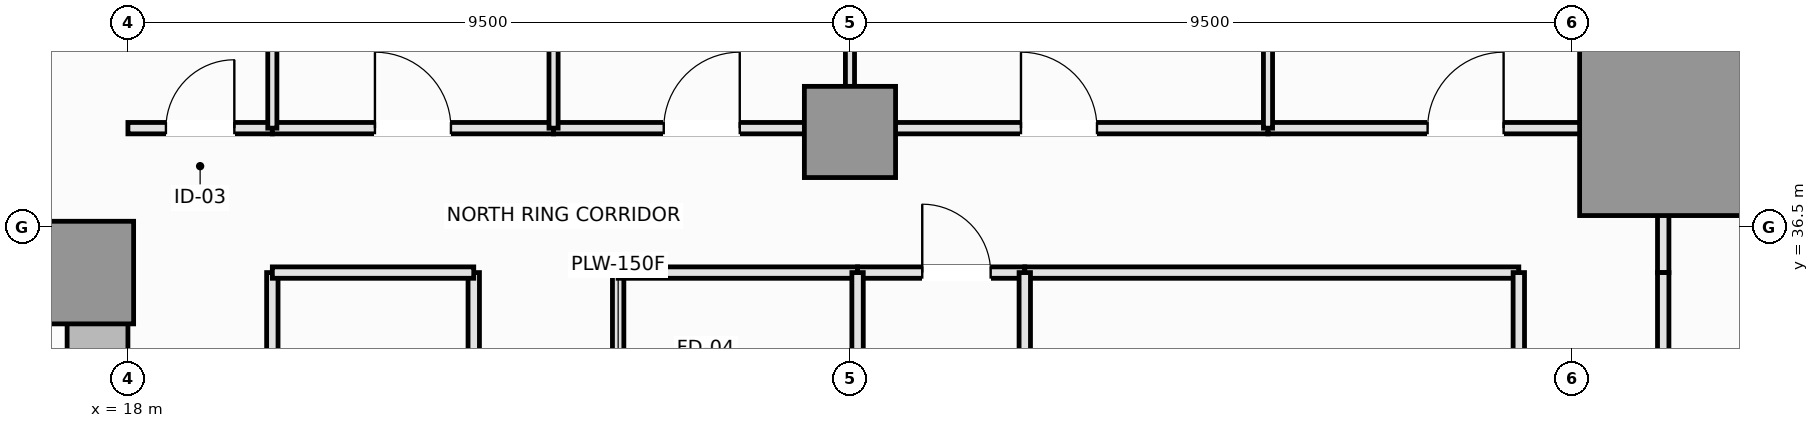
"""IFC4 building model, lengths in metres.
Left out: names, types, materials, properties, quantities, classifications, styles, units other than length and angle.
Written with IfcOpenShell. Run it as: python <this file> out.ifc"""

import sys

from ifc_helpers import new_model, si_unit, direction, frame, frame_2d, origin, origin_2d, place, context, subcontext, project, spatial, rectangle, extrude, element, fill, save


model = new_model("IFC4")
c1 = context("Model", 3, precision=1e-05, world=origin(), true_north=direction((0.0, 1.0)))
c2 = subcontext(c1, "Body", "Model", "MODEL_VIEW")
j1 = project(units=[si_unit("LENGTHUNIT", "METRE"), si_unit("PLANEANGLEUNIT", "RADIAN")], contexts=[c1])
p1 = place(None, origin())
s1 = spatial("IfcSite", under=j1, at=p1, CompositionType="ELEMENT")
p2 = place(p1, origin())
s2 = spatial("IfcBuilding", under=s1, at=p2, CompositionType="ELEMENT")
p3 = place(p2, frame((0.0, 0.0, 64.65)))
s3 = spatial("IfcBuildingStorey", under=s2, at=p3, CompositionType="ELEMENT", Elevation=64.65)
p4 = place(p3, frame((4.5, 36.1, 0.0), z_axis=(0.0, 0.0, 1.0), x_axis=(1.0, 0.0, 0.0)))
e1 = element("IfcWall", 1, at=p4, inside=s3, PredefinedType="SHEAR", context=c2, shape_type="SweptSolid", body=[
    extrude(rectangle(XDim=13.5, YDim=0.8, at=frame_2d((6.75, 0.0))), origin(), (0.0, 0.0, 1.0), 3.55),
])
p5 = place(p3, frame((17.6, 27.05, 0.0), z_axis=(0.0, 0.0, 1.0), x_axis=(0.0, 1.0, 0.0)))
e2 = element("IfcWall", 2, at=p5, inside=s3, PredefinedType="SHEAR", context=c2, shape_type="SweptSolid", body=[
    extrude(rectangle(XDim=8.65, YDim=0.8, at=frame_2d((4.325, 0.0))), origin(), (0.0, 0.0, 1.0), 3.55),
])
p6 = place(p5, frame((3.45, 0.0, 0.0)))
e3 = element("IfcOpeningElement", 3, at=p6, cuts=e2, PredefinedType="OPENING", context=c2, shape_type="SweptSolid", body=[
    extrude(rectangle(XDim=1.1, YDim=2.15, at=frame_2d((0.55, 1.075))), frame((0.0, 0.41, 0.0), z_axis=(0.0, -1.0, 0.0), x_axis=(1.0, 0.0, 0.0)), (0.0, 0.0, 1.0), 0.82),
])
p7 = place(p3, frame((17.4, 35.9, 0.0), z_axis=(0.0, 0.0, 1.0), x_axis=(1.0, 0.0, 0.0)))
e4 = element("IfcColumn", 4, at=p7, inside=s3, PredefinedType="PILASTER", context=c2, shape_type="SweptSolid", body=[
    extrude(rectangle(XDim=1.35, YDim=1.35, at=origin_2d()), origin(), (0.0, 0.0, 1.0), 3.55),
])
p8 = place(p3, frame((38.2, 37.75, 0.0), z_axis=(0.0, 0.0, 1.0), x_axis=(1.0, 0.0, 0.0)))
e5 = element("IfcColumn", 5, at=p8, inside=s3, PredefinedType="COLUMN", context=c2, shape_type="SweptSolid", body=[
    extrude(rectangle(XDim=2.2, YDim=2.2, at=origin_2d()), origin(), (0.0, 0.0, 1.0), 3.55),
])
p9 = place(p3, frame((27.5, 37.75, 0.0), z_axis=(0.0, 0.0, 1.0), x_axis=(1.0, 0.0, 0.0)))
e6 = element("IfcColumn", 6, at=p9, inside=s3, PredefinedType="COLUMN", context=c2, shape_type="SweptSolid", body=[
    extrude(rectangle(XDim=1.2, YDim=1.2, at=origin_2d()), origin(), (0.0, 0.0, 1.0), 3.55),
])
p10 = place(p3, frame((22.55, 29.75, 0.0), z_axis=(0.0, 0.0, 1.0), x_axis=(0.0, 1.0, 0.0)))
e7 = element("IfcWall", 7, at=p10, inside=s3, PredefinedType="PARTITIONING", context=c2, shape_type="SweptSolid", body=[
    extrude(rectangle(XDim=6.15, YDim=0.15, at=frame_2d((3.075, 0.0))), origin(), (0.0, 0.0, 1.0), 3.01),
])
p11 = place(p10, frame((2.575, 0.0, 0.0)))
e8 = element("IfcOpeningElement", 8, at=p11, cuts=e7, PredefinedType="OPENING", context=c2, shape_type="SweptSolid", body=[
    extrude(rectangle(XDim=1.0, YDim=2.15, at=frame_2d((0.5, 1.075))), frame((0.0, 0.085, 0.0), z_axis=(0.0, -1.0, 0.0), x_axis=(1.0, 0.0, 0.0)), (0.0, 0.0, 1.0), 0.17),
])
p12 = place(p3, frame((24.45, 32.8, 0.0), z_axis=(0.0, 0.0, 1.0), x_axis=(0.0, 1.0, 0.0)))
e9 = element("IfcWall", 9, at=p12, inside=s3, PredefinedType="PLUMBINGWALL", context=c2, shape_type="SweptSolid", body=[
    extrude(rectangle(XDim=3.1, YDim=0.15, at=frame_2d((1.55, 0.0))), origin(), (0.0, 0.0, 1.0), 3.37),
])
p13 = place(p12, frame((1.1, 0.0, 0.0)))
e10 = element("IfcOpeningElement", 10, at=p13, cuts=e9, PredefinedType="OPENING", context=c2, shape_type="SweptSolid", body=[
    extrude(rectangle(XDim=0.9, YDim=2.1, at=frame_2d((0.45, 1.05))), frame((0.0, 0.085, 0.0), z_axis=(0.0, -1.0, 0.0), x_axis=(1.0, 0.0, 0.0)), (0.0, 0.0, 1.0), 0.17),
])
p14 = place(p3, frame((19.9, 29.75, 0.0), z_axis=(0.0, 0.0, 1.0), x_axis=(0.0, 1.0, 0.0)))
e11 = element("IfcWall", 11, at=p14, inside=s3, PredefinedType="PARTITIONING", context=c2, shape_type="SweptSolid", body=[
    extrude(rectangle(XDim=6.15, YDim=0.15, at=frame_2d((3.075, 0.0))), origin(), (0.0, 0.0, 1.0), 3.37),
])
p15 = place(p3, frame((19.9, 35.9, 0.0), z_axis=(0.0, 0.0, 1.0), x_axis=(1.0, 0.0, 0.0)))
e12 = element("IfcWall", 12, at=p15, inside=s3, PredefinedType="PARTITIONING", context=c2, shape_type="SweptSolid", body=[
    extrude(rectangle(XDim=2.65, YDim=0.15, at=frame_2d((1.325, 0.0))), origin(), (0.0, 0.0, 1.0), 3.37),
])
p16 = place(p3, frame((24.45, 35.9, 0.0), z_axis=(0.0, 0.0, 1.0), x_axis=(1.0, 0.0, 0.0)))
e13 = element("IfcWall", 13, at=p16, inside=s3, PredefinedType="PLUMBINGWALL", context=c2, shape_type="SweptSolid", body=[
    extrude(rectangle(XDim=3.15, YDim=0.15, at=frame_2d((1.575, 0.0))), origin(), (0.0, 0.0, 1.0), 3.37),
])
p17 = place(p3, frame((27.6, 35.9, 0.0), z_axis=(0.0, 0.0, 1.0), x_axis=(1.0, 0.0, 0.0)))
e14 = element("IfcWall", 14, at=p17, inside=s3, PredefinedType="PLUMBINGWALL", context=c2, shape_type="SweptSolid", body=[
    extrude(rectangle(XDim=2.2, YDim=0.15, at=frame_2d((1.1, 0.0))), origin(), (0.0, 0.0, 1.0), 3.37),
])
p18 = place(p17, frame((0.851, 0.0, 0.0)))
e15 = element("IfcOpeningElement", 15, at=p18, cuts=e14, PredefinedType="OPENING", context=c2, shape_type="SweptSolid", body=[
    extrude(rectangle(XDim=0.9, YDim=2.1, at=frame_2d((0.45, 1.05))), frame((0.0, 0.085, 0.0), z_axis=(0.0, -1.0, 0.0), x_axis=(1.0, 0.0, 0.0)), (0.0, 0.0, 1.0), 0.17),
])
p19 = place(p3, frame((29.8, 35.9, 0.0), z_axis=(0.0, 0.0, 1.0), x_axis=(1.0, 0.0, 0.0)))
e16 = element("IfcWall", 16, at=p19, inside=s3, PredefinedType="PARTITIONING", context=c2, shape_type="SweptSolid", body=[
    extrude(rectangle(XDim=6.5, YDim=0.15, at=frame_2d((3.25, 0.0))), origin(), (0.0, 0.0, 1.0), 3.37),
])
p20 = place(p3, frame((18.0, 37.8, 0.0), z_axis=(0.0, 0.0, 1.0), x_axis=(1.0, 0.0, 0.0)))
e17 = element("IfcWall", 17, at=p20, inside=s3, PredefinedType="PARTITIONING", context=c2, shape_type="SweptSolid", body=[
    extrude(rectangle(XDim=1.9, YDim=0.15, at=frame_2d((0.95, 0.0))), origin(), (0.0, 0.0, 1.0), 2.72),
])
p21 = place(p20, frame((0.5, 0.0, 0.0)))
e18 = element("IfcOpeningElement", 18, at=p21, cuts=e17, PredefinedType="OPENING", context=c2, shape_type="SweptSolid", body=[
    extrude(rectangle(XDim=0.9, YDim=2.1, at=frame_2d((0.45, 1.05))), frame((0.0, 0.085, 0.0), z_axis=(0.0, -1.0, 0.0), x_axis=(1.0, 0.0, 0.0)), (0.0, 0.0, 1.0), 0.17),
])
p22 = place(p3, frame((19.9, 37.8, 0.0), z_axis=(0.0, 0.0, 1.0), x_axis=(1.0, 0.0, 0.0)))
e19 = element("IfcWall", 19, at=p22, inside=s3, PredefinedType="PARTITIONING", context=c2, shape_type="SweptSolid", body=[
    extrude(rectangle(XDim=3.7, YDim=0.15, at=frame_2d((1.85, 0.0))), origin(), (0.0, 0.0, 1.0), 2.72),
])
p23 = place(p22, frame((1.35, 0.0, 0.0)))
e20 = element("IfcOpeningElement", 20, at=p23, cuts=e19, PredefinedType="OPENING", context=c2, shape_type="SweptSolid", body=[
    extrude(rectangle(XDim=1.0, YDim=2.15, at=frame_2d((0.5, 1.075))), frame((0.0, 0.085, 0.0), z_axis=(0.0, -1.0, 0.0), x_axis=(1.0, 0.0, 0.0)), (0.0, 0.0, 1.0), 0.17),
])
p24 = place(p3, frame((23.6, 37.8, 0.0), z_axis=(0.0, 0.0, 1.0), x_axis=(1.0, 0.0, 0.0)))
e21 = element("IfcWall", 21, at=p24, inside=s3, PredefinedType="PARTITIONING", context=c2, shape_type="SweptSolid", body=[
    extrude(rectangle(XDim=3.9, YDim=0.15, at=frame_2d((1.95, 0.0))), origin(), (0.0, 0.0, 1.0), 2.72),
])
p25 = place(p24, frame((1.45, 0.0, 0.0)))
e22 = element("IfcOpeningElement", 22, at=p25, cuts=e21, PredefinedType="OPENING", context=c2, shape_type="SweptSolid", body=[
    extrude(rectangle(XDim=1.0, YDim=2.15, at=frame_2d((0.5, 1.075))), frame((0.0, 0.085, 0.0), z_axis=(0.0, -1.0, 0.0), x_axis=(1.0, 0.0, 0.0)), (0.0, 0.0, 1.0), 0.17),
])
p26 = place(p3, frame((27.5, 37.8, 0.0), z_axis=(0.0, 0.0, 1.0), x_axis=(1.0, 0.0, 0.0)))
e23 = element("IfcWall", 23, at=p26, inside=s3, PredefinedType="PARTITIONING", context=c2, shape_type="SweptSolid", body=[
    extrude(rectangle(XDim=5.5, YDim=0.15, at=frame_2d((2.75, 0.0))), origin(), (0.0, 0.0, 1.0), 2.72),
])
p27 = place(p26, frame((2.25, 0.0, 0.0)))
e24 = element("IfcOpeningElement", 24, at=p27, cuts=e23, PredefinedType="OPENING", context=c2, shape_type="SweptSolid", body=[
    extrude(rectangle(XDim=1.0, YDim=2.15, at=frame_2d((0.5, 1.075))), frame((0.0, 0.085, 0.0), z_axis=(0.0, -1.0, 0.0), x_axis=(1.0, 0.0, 0.0)), (0.0, 0.0, 1.0), 0.17),
])
p28 = place(p3, frame((33.0, 37.8, 0.0), z_axis=(0.0, 0.0, 1.0), x_axis=(1.0, 0.0, 0.0)))
e25 = element("IfcWall", 25, at=p28, inside=s3, PredefinedType="PARTITIONING", context=c2, shape_type="SweptSolid", body=[
    extrude(rectangle(XDim=5.2, YDim=0.15, at=frame_2d((2.6, 0.0))), origin(), (0.0, 0.0, 1.0), 2.72),
])
p29 = place(p28, frame((2.1, 0.0, 0.0)))
e26 = element("IfcOpeningElement", 26, at=p29, cuts=e25, PredefinedType="OPENING", context=c2, shape_type="SweptSolid", body=[
    extrude(rectangle(XDim=1.0, YDim=2.15, at=frame_2d((0.5, 1.075))), frame((0.0, 0.085, 0.0), z_axis=(0.0, -1.0, 0.0), x_axis=(1.0, 0.0, 0.0)), (0.0, 0.0, 1.0), 0.17),
])
p30 = place(p3, frame((38.2, 35.9, 0.0), z_axis=(0.0, 0.0, 1.0), x_axis=(0.0, 1.0, 0.0)))
e27 = element("IfcWall", 27, at=p30, inside=s3, PredefinedType="PARTITIONING", context=c2, shape_type="SweptSolid", body=[
    extrude(rectangle(XDim=1.9, YDim=0.15, at=frame_2d((0.95, 0.0))), origin(), (0.0, 0.0, 1.0), 2.82),
])
p31 = place(p3, frame((36.3, 32.8, 0.0), z_axis=(0.0, 0.0, 1.0), x_axis=(0.0, 1.0, 0.0)))
e28 = element("IfcWall", 28, at=p31, inside=s3, PredefinedType="PARTITIONING", context=c2, shape_type="SweptSolid", body=[
    extrude(rectangle(XDim=3.1, YDim=0.15, at=frame_2d((1.55, 0.0))), origin(), (0.0, 0.0, 1.0), 3.37),
])
p32 = place(p31, frame((1.05, 0.0, 0.0)))
e29 = element("IfcOpeningElement", 29, at=p32, cuts=e28, PredefinedType="OPENING", context=c2, shape_type="SweptSolid", body=[
    extrude(rectangle(XDim=1.0, YDim=2.15, at=frame_2d((0.5, 1.075))), frame((0.0, 0.085, 0.0), z_axis=(0.0, -1.0, 0.0), x_axis=(1.0, 0.0, 0.0)), (0.0, 0.0, 1.0), 0.17),
])
p33 = place(p3, frame((38.2, 28.65, 0.0), z_axis=(0.0, 0.0, 1.0), x_axis=(0.0, 1.0, 0.0)))
e30 = element("IfcWall", 30, at=p33, inside=s3, PredefinedType="PARTITIONING", context=c2, shape_type="SweptSolid", body=[
    extrude(rectangle(XDim=7.25, YDim=0.15, at=frame_2d((3.625, 0.0))), origin(), (0.0, 0.0, 1.0), 2.82),
])
p34 = place(p33, frame((4.303, 0.0, 0.0)))
e31 = element("IfcOpeningElement", 31, at=p34, cuts=e30, PredefinedType="OPENING", context=c2, shape_type="SweptSolid", body=[
    extrude(rectangle(XDim=1.0, YDim=2.15, at=frame_2d((0.5, 1.075))), frame((0.0, 0.085, 0.0), z_axis=(0.0, -1.0, 0.0), x_axis=(1.0, 0.0, 0.0)), (0.0, 0.0, 1.0), 0.17),
])
for number, where, z_axis, x_axis in (
    (32, (27.6, 32.8, 0.0), (0.0, 0.0, 1.0), (0.0, 1.0, 0.0)),
    (33, (29.8, 32.8, 0.0), (0.0, 0.0, 1.0), (0.0, 1.0, 0.0)),
):
    element("IfcWall", number, at=place(p3, frame(where, z_axis=z_axis, x_axis=x_axis)), inside=s3, PredefinedType="PLUMBINGWALL", context=c2, shape_type="SweptSolid", body=[
        extrude(rectangle(XDim=3.1, YDim=0.15, at=frame_2d((1.55, 0.0))), origin(), (0.0, 0.0, 1.0), 3.37),
    ])
for number, where, z_axis, x_axis in (
    (34, (19.9, 37.8, 0.0), (0.0, 0.0, 1.0), (0.0, 1.0, 0.0)),
    (35, (23.6, 37.8, 0.0), (0.0, 0.0, 1.0), (0.0, 1.0, 0.0)),
):
    element("IfcWall", number, at=place(p3, frame(where, z_axis=z_axis, x_axis=x_axis)), inside=s3, PredefinedType="PARTITIONING", context=c2, shape_type="SweptSolid", body=[
        extrude(rectangle(XDim=10.19, YDim=0.12, at=frame_2d((5.095, 0.0))), origin(), (0.0, 0.0, 1.0), 3.37),
    ])
p35 = place(p3, frame((27.5, 37.8, 0.0), z_axis=(0.0, 0.0, 1.0), x_axis=(0.0, 1.0, 0.0)))
e36 = element("IfcWall", 36, at=p35, inside=s3, PredefinedType="PARTITIONING", context=c2, shape_type="SweptSolid", body=[
    extrude(rectangle(XDim=10.19, YDim=0.12, at=frame_2d((5.095, 0.0))), origin(), (0.0, 0.0, 1.0), 2.82),
])
p36 = place(p3, frame((33.0, 37.8, 0.0), z_axis=(0.0, 0.0, 1.0), x_axis=(0.0, 1.0, 0.0)))
e37 = element("IfcWall", 37, at=p36, inside=s3, PredefinedType="PARTITIONING", context=c2, shape_type="SweptSolid", body=[
    extrude(rectangle(XDim=10.19, YDim=0.12, at=frame_2d((5.095, 0.0))), origin(), (0.0, 0.0, 1.0), 3.37),
])
p37 = place(p3, frame((38.2, 37.8, 0.0), z_axis=(0.0, 0.0, 1.0), x_axis=(0.0, 1.0, 0.0)))
e38 = element("IfcWall", 38, at=p37, inside=s3, PredefinedType="PARTITIONING", context=c2, shape_type="SweptSolid", body=[
    extrude(rectangle(XDim=10.19, YDim=0.12, at=frame_2d((5.095, 0.0))), origin(), (0.0, 0.0, 1.0), 2.82),
])
p38 = place(p18, origin())
e39 = element("IfcDoor", 39, at=p38, inside=s3, OperationType="SINGLE_SWING_LEFT", PredefinedType="DOOR", context=c2, shape_type="SweptSolid", body=[
    extrude(rectangle(XDim=0.9, YDim=2.1, at=frame_2d((0.45, 1.05))), frame((0.0, 0.025, 0.0), z_axis=(0.0, -1.0, 0.0), x_axis=(1.0, 0.0, 0.0)), (0.0, 0.0, 1.0), 0.05),
])
fill(e15, e39)
p39 = place(p21, origin())
e40 = element("IfcDoor", 40, at=p39, inside=s3, OperationType="SINGLE_SWING_RIGHT", PredefinedType="DOOR", context=c2, shape_type="SweptSolid", body=[
    extrude(rectangle(XDim=0.9, YDim=2.1, at=frame_2d((0.45, 1.05))), frame((0.0, 0.025, 0.0), z_axis=(0.0, -1.0, 0.0), x_axis=(1.0, 0.0, 0.0)), (0.0, 0.0, 1.0), 0.05),
])
fill(e18, e40)
p40 = place(p23, origin())
e41 = element("IfcDoor", 41, at=p40, inside=s3, OperationType="SINGLE_SWING_LEFT", PredefinedType="DOOR", context=c2, shape_type="SweptSolid", body=[
    extrude(rectangle(XDim=1.0, YDim=2.15, at=frame_2d((0.5, 1.075))), frame((0.0, 0.025, 0.0), z_axis=(0.0, -1.0, 0.0), x_axis=(1.0, 0.0, 0.0)), (0.0, 0.0, 1.0), 0.05),
])
fill(e20, e41)
p41 = place(p25, origin())
e42 = element("IfcDoor", 42, at=p41, inside=s3, OperationType="SINGLE_SWING_RIGHT", PredefinedType="DOOR", context=c2, shape_type="SweptSolid", body=[
    extrude(rectangle(XDim=1.0, YDim=2.15, at=frame_2d((0.5, 1.075))), frame((0.0, 0.025, 0.0), z_axis=(0.0, -1.0, 0.0), x_axis=(1.0, 0.0, 0.0)), (0.0, 0.0, 1.0), 0.05),
])
fill(e22, e42)
p42 = place(p27, origin())
e43 = element("IfcDoor", 43, at=p42, inside=s3, OperationType="SINGLE_SWING_LEFT", PredefinedType="DOOR", context=c2, shape_type="SweptSolid", body=[
    extrude(rectangle(XDim=1.0, YDim=2.15, at=frame_2d((0.5, 1.075))), frame((0.0, 0.025, 0.0), z_axis=(0.0, -1.0, 0.0), x_axis=(1.0, 0.0, 0.0)), (0.0, 0.0, 1.0), 0.05),
])
fill(e24, e43)
p43 = place(p29, origin())
e44 = element("IfcDoor", 44, at=p43, inside=s3, OperationType="SINGLE_SWING_RIGHT", PredefinedType="DOOR", context=c2, shape_type="SweptSolid", body=[
    extrude(rectangle(XDim=1.0, YDim=2.15, at=frame_2d((0.5, 1.075))), frame((0.0, 0.025, 0.0), z_axis=(0.0, -1.0, 0.0), x_axis=(1.0, 0.0, 0.0)), (0.0, 0.0, 1.0), 0.05),
])
fill(e26, e44)
save(model, sys.argv[1])
